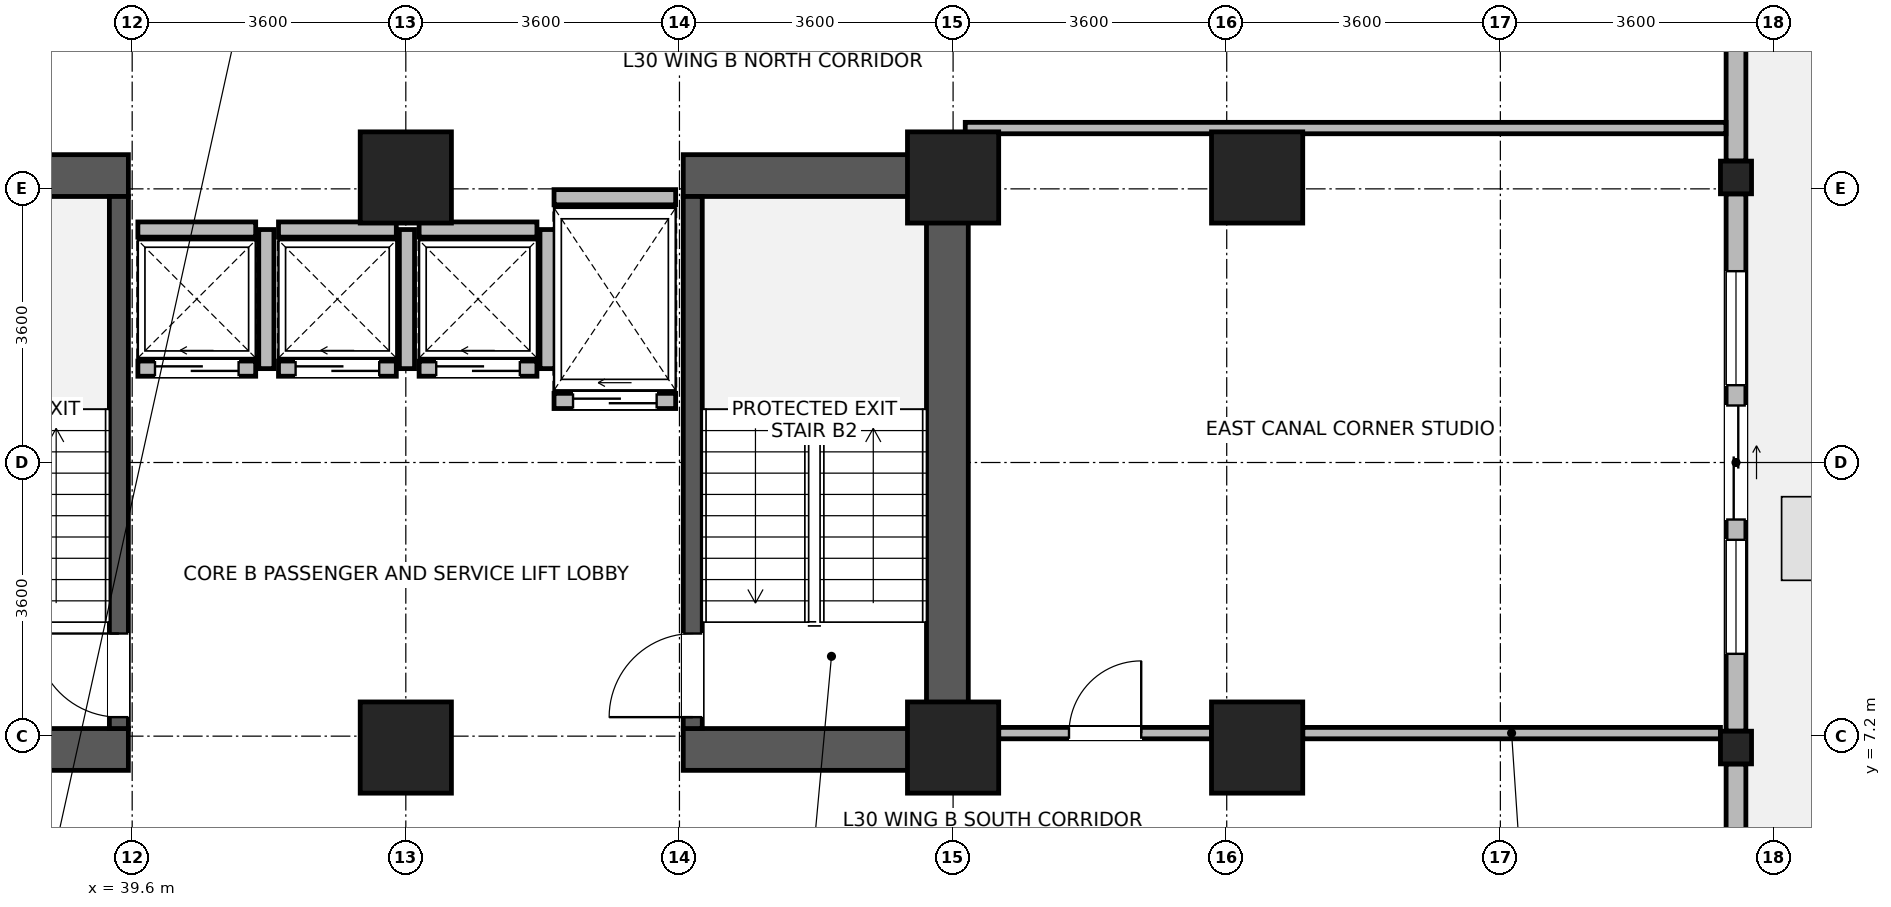
"""IFC4 building model, lengths in metres.
Left out: names, types, materials, properties, quantities, classifications, styles, units other than length and angle.
Written with IfcOpenShell. Run it as: python <this file> out.ifc"""

import sys

from ifc_helpers import new_model, si_unit, direction, frame, frame_2d, origin, origin_2d, place, context, subcontext, project, spatial, rectangle, i_section, extrude, source, transform, mapped, element, fill, save


model = new_model("IFC4")
c1 = context("Model", 3, precision=1e-05, world=origin(), true_north=direction((0.0, 1.0)))
c2 = subcontext(c1, "Body", "Model", "MODEL_VIEW")
j1 = project(units=[si_unit("LENGTHUNIT", "METRE"), si_unit("PLANEANGLEUNIT", "RADIAN")], contexts=[c1])
p1 = place(None, origin())
s1 = spatial("IfcSite", under=j1, at=p1, CompositionType="ELEMENT")
p2 = place(p1, origin())
s2 = spatial("IfcBuilding", under=s1, at=p2, CompositionType="ELEMENT")
p3 = place(p2, frame((0.0, 0.0, 119.3)))
s3 = spatial("IfcBuildingStorey", under=s2, at=p3, CompositionType="ELEMENT", Elevation=119.3)
p4 = place(p3, frame((50.325, 6.75, 0.0), z_axis=(0.0, 0.0, 1.0), x_axis=(0.0, 1.0, 0.0)))
e1 = element("IfcWall", 1, at=p4, inside=s3, PredefinedType="SHEAR", context=c2, shape_type="SweptSolid", body=[
    extrude(rectangle(XDim=8.1, YDim=0.55, at=frame_2d((4.05, 0.0))), origin(), (0.0, 0.0, 1.0), 3.45),
])
for number, where, z_axis, x_axis in (
    (2, (36.35, 7.025, 0.0), (0.0, 0.0, 1.0), (1.0, 0.0, 0.0)),
    (3, (46.85, 7.025, 0.0), (0.0, 0.0, 1.0), (1.0, 0.0, 0.0)),
    (4, (36.35, 14.575, 0.0), (0.0, 0.0, 1.0), (1.0, 0.0, 0.0)),
    (5, (46.85, 14.575, 0.0), (0.0, 0.0, 1.0), (1.0, 0.0, 0.0)),
):
    element("IfcWall", number, at=place(p3, frame(where, z_axis=z_axis, x_axis=x_axis)), inside=s3, PredefinedType="SHEAR", context=c2, shape_type="SweptSolid", body=[
        extrude(rectangle(XDim=3.2, YDim=0.55, at=frame_2d((1.6, 0.0))), origin(), (0.0, 0.0, 1.0), 3.45),
    ])
p5 = place(p3, frame((39.425, 7.3, 0.0), z_axis=(0.0, 0.0, 1.0), x_axis=(0.0, 1.0, 0.0)))
e6 = element("IfcWall", 6, at=p5, inside=s3, PredefinedType="SHEAR", context=c2, shape_type="SweptSolid", body=[
    extrude(rectangle(XDim=7.0, YDim=0.25, at=frame_2d((3.5, 0.0))), origin(), (0.0, 0.0, 1.0), 3.45),
])
p6 = place(p5, frame((0.15, 0.0, 0.0)))
e7 = element("IfcOpeningElement", 7, at=p6, cuts=e6, PredefinedType="OPENING", context=c2, shape_type="SweptSolid", body=[
    extrude(rectangle(XDim=1.1, YDim=2.08, at=frame_2d((0.55, 1.04))), frame((0.0, 0.135, 0.0), z_axis=(0.0, -1.0, 0.0), x_axis=(1.0, 0.0, 0.0)), (0.0, 0.0, 1.0), 0.27),
])
p7 = place(p3, frame((46.975, 7.3, 0.0), z_axis=(0.0, 0.0, 1.0), x_axis=(0.0, 1.0, 0.0)))
e8 = element("IfcWall", 8, at=p7, inside=s3, PredefinedType="SHEAR", context=c2, shape_type="SweptSolid", body=[
    extrude(rectangle(XDim=7.0, YDim=0.25, at=frame_2d((3.5, 0.0))), origin(), (0.0, 0.0, 1.0), 3.45),
])
p8 = place(p7, frame((0.15, 0.0, 0.0)))
e9 = element("IfcOpeningElement", 9, at=p8, cuts=e8, PredefinedType="OPENING", context=c2, shape_type="SweptSolid", body=[
    extrude(rectangle(XDim=1.1, YDim=2.08, at=frame_2d((0.55, 1.04))), frame((0.0, 0.135, 0.0), z_axis=(0.0, -1.0, 0.0), x_axis=(1.0, 0.0, 0.0)), (0.0, 0.0, 1.0), 0.27),
])
m1 = source(origin(), c2, "Body", "SweptSolid", [
    extrude(rectangle(XDim=1.2, YDim=1.2, at=origin_2d()), origin(), (0.0, 0.0, 1.0), 3.7),
])
for number, where, z_axis, x_axis in (
    (10, (43.2, 7.05, 0.0), (0.0, 0.0, 1.0), (1.0, 0.0, 0.0)),
    (11, (43.2, 14.55, 0.0), (0.0, 0.0, 1.0), (1.0, 0.0, 0.0)),
    (12, (50.4, 7.05, 0.0), (0.0, 0.0, 1.0), (1.0, 0.0, 0.0)),
    (13, (50.4, 14.55, 0.0), (0.0, 0.0, 1.0), (1.0, 0.0, 0.0)),
    (14, (54.4, 7.05, 0.0), (0.0, 0.0, 1.0), (1.0, 0.0, 0.0)),
    (15, (54.4, 14.55, 0.0), (0.0, 0.0, 1.0), (1.0, 0.0, 0.0)),
):
    element("IfcColumn", number, at=place(p3, frame(where, z_axis=z_axis, x_axis=x_axis)), inside=s3, PredefinedType="COLUMN", context=c2, shape_type="MappedRepresentation", body=[
        mapped(m1, transform((0.0, 0.0, 0.0), x_axis=(1.0, 0.0, 0.0), y_axis=(0.0, 1.0, 0.0), z_axis=(0.0, 0.0, 1.0), scale=1.0)),
    ])
m2 = source(origin(), c2, "Body", "SweptSolid", [
    extrude(i_section(OverallWidth=0.409, OverallDepth=0.43, WebThickness=0.024, FlangeThickness=0.033, FilletRadius=0.015, at=origin_2d()), origin(), (0.0, 0.0, 1.0), 3.7),
])
for number, where, z_axis, x_axis in (
    (16, (60.7, 7.05, 0.0), (0.0, 0.0, 1.0), (1.0, 0.0, 0.0)),
    (17, (60.7, 14.55, 0.0), (0.0, 0.0, 1.0), (1.0, 0.0, 0.0)),
):
    element("IfcColumn", number, at=place(p3, frame(where, z_axis=z_axis, x_axis=x_axis)), inside=s3, PredefinedType="COLUMN", context=c2, shape_type="MappedRepresentation", body=[
        mapped(m2, transform((0.0, 0.0, 0.0), x_axis=(1.0, 0.0, 0.0), y_axis=(0.0, 1.0, 0.0), z_axis=(0.0, 0.0, 1.0), scale=1.0)),
    ])
p9 = place(p3, frame((60.7, 6.834, 0.0), z_axis=(0.0, 0.0, 1.0), x_axis=(0.0, -1.0, 0.0)))
e18 = element("IfcWall", 18, at=p9, inside=s3, PredefinedType="STANDARD", context=c2, shape_type="SweptSolid", body=[
    extrude(rectangle(XDim=2.164, YDim=0.26, at=frame_2d((1.082, 0.0))), origin(), (0.0, 0.0, 1.0), 3.43),
])
p10 = place(p3, frame((60.7, 14.334, 0.0), z_axis=(0.0, 0.0, 1.0), x_axis=(0.0, -1.0, 0.0)))
e19 = element("IfcWall", 19, at=p10, inside=s3, PredefinedType="STANDARD", context=c2, shape_type="SweptSolid", body=[
    extrude(rectangle(XDim=7.068, YDim=0.26, at=frame_2d((3.534, 0.0))), origin(), (0.0, 0.0, 1.0), 2.98),
])
p11 = place(p10, frame((2.784, 0.0, 0.0)))
e20 = element("IfcOpeningElement", 20, at=p11, cuts=e19, PredefinedType="OPENING", context=c2, shape_type="SweptSolid", body=[
    extrude(rectangle(XDim=1.5, YDim=2.15, at=frame_2d((0.75, 1.075))), frame((0.0, 0.14, 0.0), z_axis=(0.0, -1.0, 0.0), x_axis=(1.0, 0.0, 0.0)), (0.0, 0.0, 1.0), 0.28),
])
p12 = place(p10, frame((1.017, 0.0, 0.85)))
e21 = element("IfcOpeningElement", 21, at=p12, cuts=e19, PredefinedType="OPENING", context=c2, shape_type="SweptSolid", body=[
    extrude(rectangle(XDim=1.5, YDim=1.85, at=frame_2d((0.75, 0.925))), frame((0.0, 0.14, 0.0), z_axis=(0.0, -1.0, 0.0), x_axis=(1.0, 0.0, 0.0)), (0.0, 0.0, 1.0), 0.28),
])
p13 = place(p10, frame((4.551, 0.0, 0.85)))
e22 = element("IfcOpeningElement", 22, at=p13, cuts=e19, PredefinedType="OPENING", context=c2, shape_type="SweptSolid", body=[
    extrude(rectangle(XDim=1.5, YDim=1.85, at=frame_2d((0.75, 0.925))), frame((0.0, 0.14, 0.0), z_axis=(0.0, -1.0, 0.0), x_axis=(1.0, 0.0, 0.0)), (0.0, 0.0, 1.0), 0.28),
])
p14 = place(p3, frame((60.7, 21.384, 0.0), z_axis=(0.0, 0.0, 1.0), x_axis=(0.0, -1.0, 0.0)))
e23 = element("IfcWall", 23, at=p14, inside=s3, PredefinedType="STANDARD", context=c2, shape_type="SweptSolid", body=[
    extrude(rectangle(XDim=6.618, YDim=0.26, at=frame_2d((3.309, 0.0))), origin(), (0.0, 0.0, 1.0), 2.98),
])
p15 = place(p14, frame((0.905, 0.0, 0.85)))
e24 = element("IfcOpeningElement", 24, at=p15, cuts=e23, PredefinedType="OPENING", context=c2, shape_type="SweptSolid", body=[
    extrude(rectangle(XDim=1.5, YDim=1.85, at=frame_2d((0.75, 0.925))), frame((0.0, 0.14, 0.0), z_axis=(0.0, -1.0, 0.0), x_axis=(1.0, 0.0, 0.0)), (0.0, 0.0, 1.0), 0.28),
])
p16 = place(p14, frame((2.834, 0.0, 0.85)))
e25 = element("IfcOpeningElement", 25, at=p16, cuts=e23, PredefinedType="OPENING", context=c2, shape_type="SweptSolid", body=[
    extrude(rectangle(XDim=0.95, YDim=1.75, at=frame_2d((0.475, 0.875))), frame((0.0, 0.14, 0.0), z_axis=(0.0, -1.0, 0.0), x_axis=(1.0, 0.0, 0.0)), (0.0, 0.0, 1.0), 0.28),
])
p17 = place(p3, frame((39.675, 12.035, 0.0), z_axis=(0.0, 0.0, 1.0), x_axis=(1.0, 0.0, 0.0)))
e26 = element("IfcWall", 26, at=p17, inside=s3, PredefinedType="PARTITIONING", context=c2, shape_type="SweptSolid", body=[
    extrude(rectangle(XDim=1.55, YDim=0.2, at=frame_2d((0.775, 0.0))), origin(), (0.0, 0.0, 1.0), 3.43),
])
p18 = place(p17, frame((0.225, 0.0, 0.0)))
e27 = element("IfcOpeningElement", 27, at=p18, cuts=e26, PredefinedType="OPENING", context=c2, shape_type="SweptSolid", body=[
    extrude(rectangle(XDim=1.1, YDim=2.12, at=frame_2d((0.55, 1.06))), frame((0.0, 0.11, 0.0), z_axis=(0.0, -1.0, 0.0), x_axis=(1.0, 0.0, 0.0)), (0.0, 0.0, 1.0), 0.22),
])
p19 = place(p3, frame((39.675, 13.865, 0.0), z_axis=(0.0, 0.0, 1.0), x_axis=(1.0, 0.0, 0.0)))
e28 = element("IfcWall", 28, at=p19, inside=s3, PredefinedType="PARTITIONING", context=c2, shape_type="SweptSolid", body=[
    extrude(rectangle(XDim=1.55, YDim=0.2, at=frame_2d((0.775, 0.0))), origin(), (0.0, 0.0, 1.0), 3.43),
])
p20 = place(p3, frame((41.365, 12.035, 0.0), z_axis=(0.0, 0.0, 1.0), x_axis=(0.0, 1.0, 0.0)))
e29 = element("IfcWall", 29, at=p20, inside=s3, PredefinedType="PARTITIONING", context=c2, shape_type="SweptSolid", body=[
    extrude(rectangle(XDim=1.83, YDim=0.2, at=frame_2d((0.915, 0.0))), origin(), (0.0, 0.0, 1.0), 3.43),
])
p21 = place(p3, frame((41.525, 12.035, 0.0), z_axis=(0.0, 0.0, 1.0), x_axis=(1.0, 0.0, 0.0)))
e30 = element("IfcWall", 30, at=p21, inside=s3, PredefinedType="PARTITIONING", context=c2, shape_type="SweptSolid", body=[
    extrude(rectangle(XDim=1.55, YDim=0.2, at=frame_2d((0.775, 0.0))), origin(), (0.0, 0.0, 1.0), 3.43),
])
p22 = place(p21, frame((0.225, 0.0, 0.0)))
e31 = element("IfcOpeningElement", 31, at=p22, cuts=e30, PredefinedType="OPENING", context=c2, shape_type="SweptSolid", body=[
    extrude(rectangle(XDim=1.1, YDim=2.12, at=frame_2d((0.55, 1.06))), frame((0.0, 0.11, 0.0), z_axis=(0.0, -1.0, 0.0), x_axis=(1.0, 0.0, 0.0)), (0.0, 0.0, 1.0), 0.22),
])
p23 = place(p3, frame((41.525, 13.865, 0.0), z_axis=(0.0, 0.0, 1.0), x_axis=(1.0, 0.0, 0.0)))
e32 = element("IfcWall", 32, at=p23, inside=s3, PredefinedType="PARTITIONING", context=c2, shape_type="SweptSolid", body=[
    extrude(rectangle(XDim=1.55, YDim=0.2, at=frame_2d((0.775, 0.0))), origin(), (0.0, 0.0, 1.0), 3.43),
])
p24 = place(p3, frame((43.215, 12.035, 0.0), z_axis=(0.0, 0.0, 1.0), x_axis=(0.0, 1.0, 0.0)))
e33 = element("IfcWall", 33, at=p24, inside=s3, PredefinedType="PARTITIONING", context=c2, shape_type="SweptSolid", body=[
    extrude(rectangle(XDim=1.83, YDim=0.2, at=frame_2d((0.915, 0.0))), origin(), (0.0, 0.0, 1.0), 3.43),
])
p25 = place(p3, frame((43.375, 12.035, 0.0), z_axis=(0.0, 0.0, 1.0), x_axis=(1.0, 0.0, 0.0)))
e34 = element("IfcWall", 34, at=p25, inside=s3, PredefinedType="PARTITIONING", context=c2, shape_type="SweptSolid", body=[
    extrude(rectangle(XDim=1.55, YDim=0.2, at=frame_2d((0.775, 0.0))), origin(), (0.0, 0.0, 1.0), 3.43),
])
p26 = place(p25, frame((0.225, 0.0, 0.0)))
e35 = element("IfcOpeningElement", 35, at=p26, cuts=e34, PredefinedType="OPENING", context=c2, shape_type="SweptSolid", body=[
    extrude(rectangle(XDim=1.1, YDim=2.12, at=frame_2d((0.55, 1.06))), frame((0.0, 0.11, 0.0), z_axis=(0.0, -1.0, 0.0), x_axis=(1.0, 0.0, 0.0)), (0.0, 0.0, 1.0), 0.22),
])
p27 = place(p3, frame((43.375, 13.865, 0.0), z_axis=(0.0, 0.0, 1.0), x_axis=(1.0, 0.0, 0.0)))
e36 = element("IfcWall", 36, at=p27, inside=s3, PredefinedType="PARTITIONING", context=c2, shape_type="SweptSolid", body=[
    extrude(rectangle(XDim=1.55, YDim=0.2, at=frame_2d((0.775, 0.0))), origin(), (0.0, 0.0, 1.0), 3.43),
])
p28 = place(p3, frame((45.065, 12.035, 0.0), z_axis=(0.0, 0.0, 1.0), x_axis=(0.0, 1.0, 0.0)))
e37 = element("IfcWall", 37, at=p28, inside=s3, PredefinedType="PARTITIONING", context=c2, shape_type="SweptSolid", body=[
    extrude(rectangle(XDim=1.83, YDim=0.2, at=frame_2d((0.915, 0.0))), origin(), (0.0, 0.0, 1.0), 3.43),
])
p29 = place(p3, frame((45.15, 11.61, 0.0), z_axis=(0.0, 0.0, 1.0), x_axis=(1.0, 0.0, 0.0)))
e38 = element("IfcWall", 38, at=p29, inside=s3, PredefinedType="PARTITIONING", context=c2, shape_type="SweptSolid", body=[
    extrude(rectangle(XDim=1.6, YDim=0.2, at=frame_2d((0.8, 0.0))), origin(), (0.0, 0.0, 1.0), 3.43),
])
p30 = place(p29, frame((0.25, 0.0, 0.0)))
e39 = element("IfcOpeningElement", 39, at=p30, cuts=e38, PredefinedType="OPENING", context=c2, shape_type="SweptSolid", body=[
    extrude(rectangle(XDim=1.1, YDim=2.12, at=frame_2d((0.55, 1.06))), frame((0.0, 0.11, 0.0), z_axis=(0.0, -1.0, 0.0), x_axis=(1.0, 0.0, 0.0)), (0.0, 0.0, 1.0), 0.22),
])
p31 = place(p3, frame((45.15, 14.29, 0.0), z_axis=(0.0, 0.0, 1.0), x_axis=(1.0, 0.0, 0.0)))
e40 = element("IfcWall", 40, at=p31, inside=s3, PredefinedType="PARTITIONING", context=c2, shape_type="SweptSolid", body=[
    extrude(rectangle(XDim=1.6, YDim=0.2, at=frame_2d((0.8, 0.0))), origin(), (0.0, 0.0, 1.0), 2.43),
])
p32 = place(p3, frame((51.0, 7.24, 0.0), z_axis=(0.0, 0.0, 1.0), x_axis=(1.0, 0.0, 0.0)))
e41 = element("IfcWall", 41, at=p32, inside=s3, PredefinedType="PARTITIONING", context=c2, shape_type="SweptSolid", body=[
    extrude(rectangle(XDim=2.8, YDim=0.15, at=frame_2d((1.4, 0.0))), origin(), (0.0, 0.0, 1.0), 2.78),
])
p33 = place(p32, frame((0.925, 0.0, 0.0)))
e42 = element("IfcOpeningElement", 42, at=p33, cuts=e41, PredefinedType="OPENING", context=c2, shape_type="SweptSolid", body=[
    extrude(rectangle(XDim=0.95, YDim=2.1, at=frame_2d((0.475, 1.05))), frame((0.0, 0.085, 0.0), z_axis=(0.0, -1.0, 0.0), x_axis=(1.0, 0.0, 0.0)), (0.0, 0.0, 1.0), 0.17),
])
p34 = place(p3, frame((55.0, 7.24, 0.0), z_axis=(0.0, 0.0, 1.0), x_axis=(1.0, 0.0, 0.0)))
e43 = element("IfcWall", 43, at=p34, inside=s3, PredefinedType="PARTITIONING", context=c2, shape_type="SweptSolid", body=[
    extrude(rectangle(XDim=5.496, YDim=0.15, at=frame_2d((2.748, 0.0))), origin(), (0.0, 0.0, 1.0), 2.78),
])
p35 = place(p3, frame((50.56, 15.2, 0.0), z_axis=(0.0, 0.0, 1.0), x_axis=(1.0, 0.0, 0.0)))
e44 = element("IfcWall", 44, at=p35, inside=s3, PredefinedType="PARTITIONING", context=c2, shape_type="SweptSolid", body=[
    extrude(rectangle(XDim=10.008, YDim=0.15, at=frame_2d((5.004, 0.0))), origin(), (0.0, 0.0, 1.0), 3.43),
])
p36 = place(p11, origin())
e45 = element("IfcDoor", 45, at=p36, inside=s3, OperationType="SLIDING_TO_LEFT", PredefinedType="DOOR", context=c2, shape_type="SweptSolid", body=[
    extrude(rectangle(XDim=1.5, YDim=2.15, at=frame_2d((0.75, 1.075))), frame((0.0, 0.025, 0.0), z_axis=(0.0, -1.0, 0.0), x_axis=(1.0, 0.0, 0.0)), (0.0, 0.0, 1.0), 0.05),
])
fill(e20, e45)
p37 = place(p12, origin())
e46 = element("IfcWindow", 46, at=p37, inside=s3, PartitioningType="SINGLE_PANEL", PredefinedType="WINDOW", context=c2, shape_type="SweptSolid", body=[
    extrude(rectangle(XDim=1.5, YDim=1.85, at=frame_2d((0.75, 0.925))), frame((0.0, 0.03, 0.0), z_axis=(0.0, -1.0, 0.0), x_axis=(1.0, 0.0, 0.0)), (0.0, 0.0, 1.0), 0.06),
])
fill(e21, e46)
p38 = place(p13, origin())
e47 = element("IfcWindow", 47, at=p38, inside=s3, PartitioningType="SINGLE_PANEL", PredefinedType="WINDOW", context=c2, shape_type="SweptSolid", body=[
    extrude(rectangle(XDim=1.5, YDim=1.85, at=frame_2d((0.75, 0.925))), frame((0.0, 0.03, 0.0), z_axis=(0.0, -1.0, 0.0), x_axis=(1.0, 0.0, 0.0)), (0.0, 0.0, 1.0), 0.06),
])
fill(e22, e47)
p39 = place(p6, origin())
e48 = element("IfcDoor", 48, at=p39, inside=s3, OperationType="SINGLE_SWING_RIGHT", PredefinedType="DOOR", context=c2, shape_type="SweptSolid", body=[
    extrude(rectangle(XDim=1.1, YDim=2.08, at=frame_2d((0.55, 1.04))), frame((0.0, 0.025, 0.0), z_axis=(0.0, -1.0, 0.0), x_axis=(1.0, 0.0, 0.0)), (0.0, 0.0, 1.0), 0.05),
])
fill(e7, e48)
p40 = place(p8, origin())
e49 = element("IfcDoor", 49, at=p40, inside=s3, OperationType="SINGLE_SWING_LEFT", PredefinedType="DOOR", context=c2, shape_type="SweptSolid", body=[
    extrude(rectangle(XDim=1.1, YDim=2.08, at=frame_2d((0.55, 1.04))), frame((0.0, 0.025, 0.0), z_axis=(0.0, -1.0, 0.0), x_axis=(1.0, 0.0, 0.0)), (0.0, 0.0, 1.0), 0.05),
])
fill(e9, e49)
p41 = place(p18, origin())
e50 = element("IfcDoor", 50, at=p41, inside=s3, OperationType="SLIDING_TO_LEFT", PredefinedType="DOOR", context=c2, shape_type="SweptSolid", body=[
    extrude(rectangle(XDim=1.1, YDim=2.12, at=frame_2d((0.55, 1.06))), frame((0.0, 0.025, 0.0), z_axis=(0.0, -1.0, 0.0), x_axis=(1.0, 0.0, 0.0)), (0.0, 0.0, 1.0), 0.05),
])
fill(e27, e50)
p42 = place(p22, origin())
e51 = element("IfcDoor", 51, at=p42, inside=s3, OperationType="SLIDING_TO_LEFT", PredefinedType="DOOR", context=c2, shape_type="SweptSolid", body=[
    extrude(rectangle(XDim=1.1, YDim=2.12, at=frame_2d((0.55, 1.06))), frame((0.0, 0.025, 0.0), z_axis=(0.0, -1.0, 0.0), x_axis=(1.0, 0.0, 0.0)), (0.0, 0.0, 1.0), 0.05),
])
fill(e31, e51)
p43 = place(p26, origin())
e52 = element("IfcDoor", 52, at=p43, inside=s3, OperationType="SLIDING_TO_LEFT", PredefinedType="DOOR", context=c2, shape_type="SweptSolid", body=[
    extrude(rectangle(XDim=1.1, YDim=2.12, at=frame_2d((0.55, 1.06))), frame((0.0, 0.025, 0.0), z_axis=(0.0, -1.0, 0.0), x_axis=(1.0, 0.0, 0.0)), (0.0, 0.0, 1.0), 0.05),
])
fill(e35, e52)
p44 = place(p30, origin())
e53 = element("IfcDoor", 53, at=p44, inside=s3, OperationType="SLIDING_TO_LEFT", PredefinedType="DOOR", context=c2, shape_type="SweptSolid", body=[
    extrude(rectangle(XDim=1.1, YDim=2.12, at=frame_2d((0.55, 1.06))), frame((0.0, 0.025, 0.0), z_axis=(0.0, -1.0, 0.0), x_axis=(1.0, 0.0, 0.0)), (0.0, 0.0, 1.0), 0.05),
])
fill(e39, e53)
p45 = place(p33, origin())
e54 = element("IfcDoor", 54, at=p45, inside=s3, OperationType="SINGLE_SWING_RIGHT", PredefinedType="DOOR", context=c2, shape_type="SweptSolid", body=[
    extrude(rectangle(XDim=0.95, YDim=2.1, at=frame_2d((0.475, 1.05))), frame((0.0, 0.025, 0.0), z_axis=(0.0, -1.0, 0.0), x_axis=(1.0, 0.0, 0.0)), (0.0, 0.0, 1.0), 0.05),
])
fill(e42, e54)
save(model, sys.argv[1])
